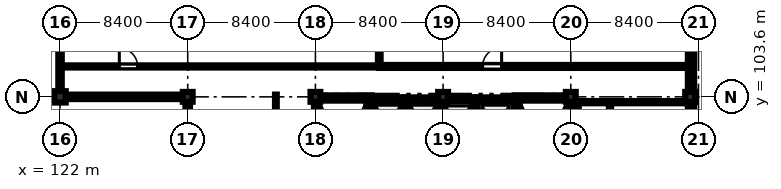
"""IFC4 building model, lengths in metres.
Left out: names, types, materials, properties, quantities, classifications, styles, units other than length and angle.
Written with IfcOpenShell. Run it as: python <this file> out.ifc"""

import sys

from ifc_helpers import new_model, si_unit, direction, frame, frame_2d, origin, origin_2d, place, context, subcontext, project, spatial, rectangle, extrude, element, fill, save


model = new_model("IFC4")
c1 = context("Model", 3, precision=1e-05, world=origin(), true_north=direction((0.0, 1.0)))
c2 = subcontext(c1, "Body", "Model", "MODEL_VIEW")
j1 = project(units=[si_unit("LENGTHUNIT", "METRE"), si_unit("PLANEANGLEUNIT", "RADIAN")], contexts=[c1])
p1 = place(None, origin())
s1 = spatial("IfcSite", under=j1, at=p1, CompositionType="ELEMENT")
p2 = place(p1, origin())
s2 = spatial("IfcBuilding", under=s1, at=p2, CompositionType="ELEMENT")
p3 = place(p2, frame((0.0, 0.0, 65.7)))
s3 = spatial("IfcBuildingStorey", under=s2, at=p3, CompositionType="ELEMENT", Elevation=65.7)
p4 = place(p3, frame((122.0, 103.6, 0.0), z_axis=(0.0, 0.0, 1.0), x_axis=(1.0, 0.0, 0.0)))
e1 = element("IfcColumn", 1, at=p4, inside=s3, PredefinedType="COLUMN", context=c2, shape_type="SweptSolid", body=[
    extrude(rectangle(XDim=0.75, YDim=0.75, at=origin_2d()), origin(), (0.0, 0.0, 1.0), 4.3),
])
for number, where, z_axis, x_axis in (
    (2, (130.4, 103.6, 0.0), (0.0, 0.0, 1.0), (1.0, 0.0, 0.0)),
    (3, (138.8, 103.6, 0.0), (0.0, 0.0, 1.0), (1.0, 0.0, 0.0)),
    (4, (147.2, 103.6, 0.0), (0.0, 0.0, 1.0), (1.0, 0.0, 0.0)),
    (5, (155.6, 103.6, 0.0), (0.0, 0.0, 1.0), (1.0, 0.0, 0.0)),
    (6, (163.45, 103.6, 0.0), (0.0, 0.0, 1.0), (1.0, 0.0, 0.0)),
):
    element("IfcColumn", number, at=place(p3, frame(where, z_axis=z_axis, x_axis=x_axis)), inside=s3, PredefinedType="COLUMN", context=c2, shape_type="SweptSolid", body=[
        extrude(rectangle(XDim=0.65, YDim=0.65, at=origin_2d()), origin(), (0.0, 0.0, 1.0), 4.3),
    ])
p5 = place(p3, frame((138.7, 103.525, 0.0), z_axis=(0.0, 0.0, 1.0), x_axis=(1.0, 0.0, 0.0)))
e7 = element("IfcWall", 7, at=p5, inside=s3, PredefinedType="SHEAR", context=c2, shape_type="SweptSolid", body=[
    extrude(rectangle(XDim=3.8, YDim=0.35, at=frame_2d((1.9, 0.0))), origin(), (0.0, 0.0, 1.0), 4.3),
])
p6 = place(p3, frame((138.875, 95.45, 0.0), z_axis=(0.0, 0.0, 1.0), x_axis=(0.0, 1.0, 0.0)))
e8 = element("IfcWall", 8, at=p6, inside=s3, PredefinedType="SHEAR", context=c2, shape_type="SweptSolid", body=[
    extrude(rectangle(XDim=7.9, YDim=0.35, at=frame_2d((3.95, 0.0))), origin(), (0.0, 0.0, 1.0), 4.3),
])
p7 = place(p3, frame((142.325, 95.45, 0.0), z_axis=(0.0, 0.0, 1.0), x_axis=(0.0, 1.0, 0.0)))
e9 = element("IfcWall", 9, at=p7, inside=s3, PredefinedType="SHEAR", context=c2, shape_type="SweptSolid", body=[
    extrude(rectangle(XDim=7.9, YDim=0.35, at=frame_2d((3.95, 0.0))), origin(), (0.0, 0.0, 1.0), 4.3),
])
p8 = place(p7, frame((0.22, 0.0, 0.0)))
e10 = element("IfcOpeningElement", 10, at=p8, cuts=e9, PredefinedType="OPENING", context=c2, shape_type="SweptSolid", body=[
    extrude(rectangle(XDim=1.15, YDim=2.15, at=frame_2d((0.575, 1.075))), frame((0.0, 0.185, 0.0), z_axis=(0.0, -1.0, 0.0), x_axis=(1.0, 0.0, 0.0)), (0.0, 0.0, 1.0), 0.37),
])
p9 = place(p3, frame((151.9, 103.525, 0.0), z_axis=(0.0, 0.0, 1.0), x_axis=(1.0, 0.0, 0.0)))
e11 = element("IfcWall", 11, at=p9, inside=s3, PredefinedType="SHEAR", context=c2, shape_type="SweptSolid", body=[
    extrude(rectangle(XDim=3.8, YDim=0.35, at=frame_2d((1.9, 0.0))), origin(), (0.0, 0.0, 1.0), 4.3),
])
p10 = place(p3, frame((152.075, 95.45, 0.0), z_axis=(0.0, 0.0, 1.0), x_axis=(0.0, 1.0, 0.0)))
e12 = element("IfcWall", 12, at=p10, inside=s3, PredefinedType="SHEAR", context=c2, shape_type="SweptSolid", body=[
    extrude(rectangle(XDim=7.9, YDim=0.35, at=frame_2d((3.95, 0.0))), origin(), (0.0, 0.0, 1.0), 4.3),
])
p11 = place(p10, frame((0.35, 0.0, 0.0)))
e13 = element("IfcOpeningElement", 13, at=p11, cuts=e12, PredefinedType="OPENING", context=c2, shape_type="SweptSolid", body=[
    extrude(rectangle(XDim=1.15, YDim=2.15, at=frame_2d((0.575, 1.075))), frame((0.0, 0.185, 0.0), z_axis=(0.0, -1.0, 0.0), x_axis=(1.0, 0.0, 0.0)), (0.0, 0.0, 1.0), 0.37),
])
p12 = place(p3, frame((155.525, 95.45, 0.0), z_axis=(0.0, 0.0, 1.0), x_axis=(0.0, 1.0, 0.0)))
e14 = element("IfcWall", 14, at=p12, inside=s3, PredefinedType="SHEAR", context=c2, shape_type="SweptSolid", body=[
    extrude(rectangle(XDim=7.9, YDim=0.35, at=frame_2d((3.95, 0.0))), origin(), (0.0, 0.0, 1.0), 4.3),
])
p13 = place(p3, frame((142.5, 103.425, 0.0), z_axis=(0.0, 0.0, 1.0), x_axis=(1.0, 0.0, 0.0)))
e15 = element("IfcWall", 15, at=p13, inside=s3, PredefinedType="SHEAR", context=c2, shape_type="SweptSolid", body=[
    extrude(rectangle(XDim=2.1, YDim=0.25, at=frame_2d((1.05, 0.0))), origin(), (0.0, 0.0, 1.0), 4.3),
])
p14 = place(p3, frame((144.725, 100.15, 0.0), z_axis=(0.0, 0.0, 1.0), x_axis=(0.0, 1.0, 0.0)))
e16 = element("IfcWall", 16, at=p14, inside=s3, PredefinedType="SHEAR", context=c2, shape_type="SweptSolid", body=[
    extrude(rectangle(XDim=3.4, YDim=0.25, at=frame_2d((1.7, 0.0))), origin(), (0.0, 0.0, 1.0), 4.3),
])
p15 = place(p3, frame((142.55, 103.425, 4.5), z_axis=(0.0, 0.0, 1.0), x_axis=(1.0, 0.0, 0.0)))
e17 = element("IfcWall", 17, at=p15, inside=s3, PredefinedType="SHEAR", context=c2, shape_type="SweptSolid", body=[
    extrude(rectangle(XDim=2.05, YDim=0.25, at=frame_2d((1.025, 0.0))), origin(), (0.0, 0.0, 1.0), 1.55),
])
for number, where, z_axis, x_axis in (
    (18, (144.725, 100.15, 4.5), (0.0, 0.0, 1.0), (0.0, 1.0, 0.0)),
    (19, (142.425, 100.15, 4.5), (0.0, 0.0, 1.0), (0.0, 1.0, 0.0)),
):
    element("IfcWall", number, at=place(p3, frame(where, z_axis=z_axis, x_axis=x_axis)), inside=s3, PredefinedType="SHEAR", context=c2, shape_type="SweptSolid", body=[
        extrude(rectangle(XDim=3.4, YDim=0.25, at=frame_2d((1.7, 0.0))), origin(), (0.0, 0.0, 1.0), 1.55),
    ])
p16 = place(p3, frame((144.85, 103.425, 0.0), z_axis=(0.0, 0.0, 1.0), x_axis=(1.0, 0.0, 0.0)))
e20 = element("IfcWall", 20, at=p16, inside=s3, PredefinedType="SHEAR", context=c2, shape_type="SweptSolid", body=[
    extrude(rectangle(XDim=2.05, YDim=0.25, at=frame_2d((1.025, 0.0))), origin(), (0.0, 0.0, 1.0), 4.3),
])
p17 = place(p3, frame((147.025, 100.15, 0.0), z_axis=(0.0, 0.0, 1.0), x_axis=(0.0, 1.0, 0.0)))
e21 = element("IfcWall", 21, at=p17, inside=s3, PredefinedType="SHEAR", context=c2, shape_type="SweptSolid", body=[
    extrude(rectangle(XDim=3.4, YDim=0.25, at=frame_2d((1.7, 0.0))), origin(), (0.0, 0.0, 1.0), 4.3),
])
p18 = place(p3, frame((144.85, 103.425, 4.5), z_axis=(0.0, 0.0, 1.0), x_axis=(1.0, 0.0, 0.0)))
e22 = element("IfcWall", 22, at=p18, inside=s3, PredefinedType="SHEAR", context=c2, shape_type="SweptSolid", body=[
    extrude(rectangle(XDim=2.05, YDim=0.25, at=frame_2d((1.025, 0.0))), origin(), (0.0, 0.0, 1.0), 1.55),
])
p19 = place(p3, frame((147.025, 100.15, 4.5), z_axis=(0.0, 0.0, 1.0), x_axis=(0.0, 1.0, 0.0)))
e23 = element("IfcWall", 23, at=p19, inside=s3, PredefinedType="SHEAR", context=c2, shape_type="SweptSolid", body=[
    extrude(rectangle(XDim=3.4, YDim=0.25, at=frame_2d((1.7, 0.0))), origin(), (0.0, 0.0, 1.0), 1.55),
])
p20 = place(p3, frame((147.15, 103.425, 0.0), z_axis=(0.0, 0.0, 1.0), x_axis=(1.0, 0.0, 0.0)))
e24 = element("IfcWall", 24, at=p20, inside=s3, PredefinedType="SHEAR", context=c2, shape_type="SweptSolid", body=[
    extrude(rectangle(XDim=2.05, YDim=0.25, at=frame_2d((1.025, 0.0))), origin(), (0.0, 0.0, 1.0), 4.3),
])
p21 = place(p3, frame((149.325, 100.35, 0.0), z_axis=(0.0, 0.0, 1.0), x_axis=(0.0, 1.0, 0.0)))
e25 = element("IfcWall", 25, at=p21, inside=s3, PredefinedType="SHEAR", context=c2, shape_type="SweptSolid", body=[
    extrude(rectangle(XDim=3.2, YDim=0.25, at=frame_2d((1.6, 0.0))), origin(), (0.0, 0.0, 1.0), 4.3),
])
p22 = place(p3, frame((147.15, 103.425, 4.5), z_axis=(0.0, 0.0, 1.0), x_axis=(1.0, 0.0, 0.0)))
e26 = element("IfcWall", 26, at=p22, inside=s3, PredefinedType="SHEAR", context=c2, shape_type="SweptSolid", body=[
    extrude(rectangle(XDim=2.05, YDim=0.25, at=frame_2d((1.025, 0.0))), origin(), (0.0, 0.0, 1.0), 1.55),
])
p23 = place(p3, frame((149.325, 100.35, 4.5), z_axis=(0.0, 0.0, 1.0), x_axis=(0.0, 1.0, 0.0)))
e27 = element("IfcWall", 27, at=p23, inside=s3, PredefinedType="SHEAR", context=c2, shape_type="SweptSolid", body=[
    extrude(rectangle(XDim=3.2, YDim=0.25, at=frame_2d((1.6, 0.0))), origin(), (0.0, 0.0, 1.0), 1.55),
])
p24 = place(p3, frame((149.45, 103.425, 0.0), z_axis=(0.0, 0.0, 1.0), x_axis=(1.0, 0.0, 0.0)))
e28 = element("IfcWall", 28, at=p24, inside=s3, PredefinedType="SHEAR", context=c2, shape_type="SweptSolid", body=[
    extrude(rectangle(XDim=2.45, YDim=0.25, at=frame_2d((1.225, 0.0))), origin(), (0.0, 0.0, 1.0), 4.3),
])
p25 = place(p3, frame((149.45, 103.425, 4.5), z_axis=(0.0, 0.0, 1.0), x_axis=(1.0, 0.0, 0.0)))
e29 = element("IfcWall", 29, at=p25, inside=s3, PredefinedType="SHEAR", context=c2, shape_type="SweptSolid", body=[
    extrude(rectangle(XDim=2.4, YDim=0.25, at=frame_2d((1.2, 0.0))), origin(), (0.0, 0.0, 1.0), 1.55),
])
p26 = place(p3, frame((151.975, 100.05, 4.5), z_axis=(0.0, 0.0, 1.0), x_axis=(0.0, 1.0, 0.0)))
e30 = element("IfcWall", 30, at=p26, inside=s3, PredefinedType="SHEAR", context=c2, shape_type="SweptSolid", body=[
    extrude(rectangle(XDim=3.5, YDim=0.25, at=frame_2d((1.75, 0.0))), origin(), (0.0, 0.0, 1.0), 1.55),
])
p27 = place(p3, frame((163.45, 103.275, 0.0), z_axis=(0.0, 0.0, 1.0), x_axis=(0.0, -1.0, 0.0)))
e31 = element("IfcWall", 31, at=p27, inside=s3, PredefinedType="STANDARD", context=c2, shape_type="SweptSolid", body=[
    extrude(rectangle(XDim=7.75, YDim=0.3, at=frame_2d((3.875, 0.0))), origin(), (0.0, 0.0, 1.0), 3.7),
])
p28 = place(p27, frame((1.15, 0.0, 1.1)))
e32 = element("IfcOpeningElement", 32, at=p28, cuts=e31, PredefinedType="OPENING", context=c2, shape_type="SweptSolid", body=[
    extrude(rectangle(XDim=1.4, YDim=1.4, at=frame_2d((0.7, 0.7))), frame((0.0, 0.16, 0.0), z_axis=(0.0, -1.0, 0.0), x_axis=(1.0, 0.0, 0.0)), (0.0, 0.0, 1.0), 0.32),
])
p29 = place(p3, frame((163.45, 111.125, 0.0), z_axis=(0.0, 0.0, 1.0), x_axis=(0.0, -1.0, 0.0)))
e33 = element("IfcWall", 33, at=p29, inside=s3, PredefinedType="STANDARD", context=c2, shape_type="SweptSolid", body=[
    extrude(rectangle(XDim=7.2, YDim=0.3, at=frame_2d((3.6, 0.0))), origin(), (0.0, 0.0, 1.0), 3.7),
])
p30 = place(p29, frame((1.15, 0.0, 1.1)))
e34 = element("IfcOpeningElement", 34, at=p30, cuts=e33, PredefinedType="OPENING", context=c2, shape_type="SweptSolid", body=[
    extrude(rectangle(XDim=1.8, YDim=1.8, at=frame_2d((0.9, 0.9))), frame((0.0, 0.16, 0.0), z_axis=(0.0, -1.0, 0.0), x_axis=(1.0, 0.0, 0.0)), (0.0, 0.0, 1.0), 0.32),
])
p31 = place(p3, frame((130.4, 95.525, 0.0), z_axis=(0.0, 0.0, 1.0), x_axis=(0.0, 1.0, 0.0)))
e35 = element("IfcWall", 35, at=p31, inside=s3, PredefinedType="STANDARD", context=c2, shape_type="SweptSolid", body=[
    extrude(rectangle(XDim=7.75, YDim=0.3, at=frame_2d((3.875, 0.0))), origin(), (0.0, 0.0, 1.0), 3.7),
])
p32 = place(p31, frame((2.4, 0.0, 1.0)))
e36 = element("IfcOpeningElement", 36, at=p32, cuts=e35, PredefinedType="OPENING", context=c2, shape_type="SweptSolid", body=[
    extrude(rectangle(XDim=1.8, YDim=1.8, at=frame_2d((0.9, 0.9))), frame((0.0, 0.16, 0.0), z_axis=(0.0, -1.0, 0.0), x_axis=(1.0, 0.0, 0.0)), (0.0, 0.0, 1.0), 0.32),
])
p33 = place(p3, frame((130.075, 103.6, 0.0), z_axis=(0.0, 0.0, 1.0), x_axis=(-1.0, 0.0, 0.0)))
e37 = element("IfcWall", 37, at=p33, inside=s3, PredefinedType="STANDARD", context=c2, shape_type="SweptSolid", body=[
    extrude(rectangle(XDim=7.7, YDim=0.3, at=frame_2d((3.85, 0.0))), origin(), (0.0, 0.0, 1.0), 3.7),
])
p34 = place(p3, frame((163.6, 78.515, 4.5), z_axis=(0.0, 0.0, 1.0), x_axis=(0.0, 1.0, 0.0)))
e38 = element("IfcWall", 38, at=p34, inside=s3, PredefinedType="PARAPET", context=c2, shape_type="SweptSolid", body=[
    extrude(rectangle(XDim=32.97, YDim=0.23, at=frame_2d((16.485, 0.0))), origin(), (0.0, 0.0, 1.0), 1.35),
])
p35 = place(p3, frame((122.0, 111.485, 4.5), z_axis=(0.0, 0.0, 1.0), x_axis=(0.0, -1.0, 0.0)))
e39 = element("IfcWall", 39, at=p35, inside=s3, PredefinedType="PARAPET", context=c2, shape_type="SweptSolid", body=[
    extrude(rectangle(XDim=7.77, YDim=0.23, at=frame_2d((3.885, 0.0))), origin(), (0.0, 0.0, 1.0), 1.35),
])
p36 = place(p3, frame((121.885, 103.6, 4.5), z_axis=(0.0, 0.0, 1.0), x_axis=(1.0, 0.0, 0.0)))
e40 = element("IfcWall", 40, at=p36, inside=s3, PredefinedType="PARAPET", context=c2, shape_type="SweptSolid", body=[
    extrude(rectangle(XDim=8.63, YDim=0.23, at=frame_2d((4.315, 0.0))), origin(), (0.0, 0.0, 1.0), 1.35),
])
p37 = place(p3, frame((130.4, 103.485, 4.5), z_axis=(0.0, 0.0, 1.0), x_axis=(0.0, -1.0, 0.0)))
e41 = element("IfcWall", 41, at=p37, inside=s3, PredefinedType="PARAPET", context=c2, shape_type="SweptSolid", body=[
    extrude(rectangle(XDim=11.37, YDim=0.23, at=frame_2d((5.685, 0.0))), origin(), (0.0, 0.0, 1.0), 1.35),
])
p38 = place(p3, frame((158.18, 94.68, 0.0), z_axis=(0.0, 0.0, 1.0), x_axis=(0.0, 1.0, 0.0)))
e42 = element("IfcWall", 42, at=p38, inside=s3, PredefinedType="PARTITIONING", context=c2, shape_type="SweptSolid", body=[
    extrude(rectangle(XDim=8.57, YDim=0.15, at=frame_2d((4.285, 0.0))), origin(), (0.0, 0.0, 1.0), 4.3),
])
p39 = place(p38, frame((0.8, 0.0, 0.0)))
e43 = element("IfcOpeningElement", 43, at=p39, cuts=e42, PredefinedType="OPENING", context=c2, shape_type="SweptSolid", body=[
    extrude(rectangle(XDim=1.0, YDim=2.12, at=frame_2d((0.5, 1.06))), frame((0.0, 0.085, 0.0), z_axis=(0.0, -1.0, 0.0), x_axis=(1.0, 0.0, 0.0)), (0.0, 0.0, 1.0), 0.17),
])
p40 = place(p38, frame((3.5, 0.0, 0.0)))
e44 = element("IfcOpeningElement", 44, at=p40, cuts=e42, PredefinedType="OPENING", context=c2, shape_type="SweptSolid", body=[
    extrude(rectangle(XDim=0.92, YDim=2.1, at=frame_2d((0.46, 1.05))), frame((0.0, 0.085, 0.0), z_axis=(0.0, -1.0, 0.0), x_axis=(1.0, 0.0, 0.0)), (0.0, 0.0, 1.0), 0.17),
])
p41 = place(p38, frame((6.4, 0.0, 0.0)))
e45 = element("IfcOpeningElement", 45, at=p41, cuts=e42, PredefinedType="OPENING", context=c2, shape_type="SweptSolid", body=[
    extrude(rectangle(XDim=0.92, YDim=2.1, at=frame_2d((0.46, 1.05))), frame((0.0, 0.085, 0.0), z_axis=(0.0, -1.0, 0.0), x_axis=(1.0, 0.0, 0.0)), (0.0, 0.0, 1.0), 0.17),
])
p42 = place(p3, frame((156.05, 103.25, 0.0), z_axis=(0.0, 0.0, 1.0), x_axis=(1.0, 0.0, 0.0)))
e46 = element("IfcWall", 46, at=p42, inside=s3, PredefinedType="PARTITIONING", context=c2, shape_type="SweptSolid", body=[
    extrude(rectangle(XDim=7.15, YDim=0.15, at=frame_2d((3.575, 0.0))), origin(), (0.0, 0.0, 1.0), 4.3),
])
p43 = place(p3, frame((156.05, 94.68, 0.0), z_axis=(0.0, 0.0, 1.0), x_axis=(0.0, 1.0, 0.0)))
e47 = element("IfcWall", 47, at=p43, inside=s3, PredefinedType="PARTITIONING", context=c2, shape_type="SweptSolid", body=[
    extrude(rectangle(XDim=8.57, YDim=0.15, at=frame_2d((4.285, 0.0))), origin(), (0.0, 0.0, 1.0), 4.3),
])
p44 = place(p3, frame((136.2, 94.68, 0.0), z_axis=(0.0, 0.0, 1.0), x_axis=(0.0, 1.0, 0.0)))
e48 = element("IfcWall", 48, at=p44, inside=s3, PredefinedType="PARTITIONING", context=c2, shape_type="SweptSolid", body=[
    extrude(rectangle(XDim=9.07, YDim=0.12, at=frame_2d((4.535, 0.0))), origin(), (0.0, 0.0, 1.0), 4.3),
])
p45 = place(p3, frame((122.15, 105.6, 0.0), z_axis=(0.0, 0.0, 1.0), x_axis=(1.0, 0.0, 0.0)))
e49 = element("IfcWall", 49, at=p45, inside=s3, PredefinedType="PARTITIONING", context=c2, shape_type="SweptSolid", body=[
    extrude(rectangle(XDim=20.85, YDim=0.145, at=frame_2d((10.425, 0.0))), origin(), (0.0, 0.0, 1.0), 4.3),
])
p46 = place(p45, frame((3.75, 0.0, 0.0)))
e50 = element("IfcOpeningElement", 50, at=p46, cuts=e49, PredefinedType="OPENING", context=c2, shape_type="SweptSolid", body=[
    extrude(rectangle(XDim=1.2, YDim=2.2, at=frame_2d((0.6, 1.1))), frame((0.0, 0.083, 0.0), z_axis=(0.0, -1.0, 0.0), x_axis=(1.0, 0.0, 0.0)), (0.0, 0.0, 1.0), 0.165),
])
p47 = place(p3, frame((143.0, 105.6, 0.0), z_axis=(0.0, 0.0, 1.0), x_axis=(1.0, 0.0, 0.0)))
e51 = element("IfcWall", 51, at=p47, inside=s3, PredefinedType="SOLIDWALL", context=c2, shape_type="SweptSolid", body=[
    extrude(rectangle(XDim=20.35, YDim=0.2, at=frame_2d((10.175, 0.0))), origin(), (0.0, 0.0, 1.0), 4.3),
])
p48 = place(p47, frame((6.8, 0.0, 0.0)))
e52 = element("IfcOpeningElement", 52, at=p48, cuts=e51, PredefinedType="OPENING", context=c2, shape_type="SweptSolid", body=[
    extrude(rectangle(XDim=1.25, YDim=2.2, at=frame_2d((0.625, 1.1))), frame((0.0, 0.11, 0.0), z_axis=(0.0, -1.0, 0.0), x_axis=(1.0, 0.0, 0.0)), (0.0, 0.0, 1.0), 0.22),
])
p49 = place(p3, frame((143.0, 105.6, 0.0), z_axis=(0.0, 0.0, 1.0), x_axis=(0.0, 1.0, 0.0)))
e53 = element("IfcWall", 53, at=p49, inside=s3, PredefinedType="STANDARD", context=c2, shape_type="SweptSolid", body=[
    extrude(rectangle(XDim=5.75, YDim=0.18, at=frame_2d((2.875, 0.0))), origin(), (0.0, 0.0, 1.0), 3.85),
])
p50 = place(p46, origin())
e54 = element("IfcDoor", 54, at=p50, inside=s3, OperationType="SINGLE_SWING_LEFT", PredefinedType="DOOR", context=c2, shape_type="SweptSolid", body=[
    extrude(rectangle(XDim=1.2, YDim=2.2, at=frame_2d((0.6, 1.1))), frame((0.0, 0.025, 0.0), z_axis=(0.0, -1.0, 0.0), x_axis=(1.0, 0.0, 0.0)), (0.0, 0.0, 1.0), 0.05),
])
fill(e50, e54)
p51 = place(p48, origin())
e55 = element("IfcDoor", 55, at=p51, inside=s3, OperationType="SINGLE_SWING_RIGHT", PredefinedType="DOOR", context=c2, shape_type="SweptSolid", body=[
    extrude(rectangle(XDim=1.25, YDim=2.2, at=frame_2d((0.625, 1.1))), frame((0.0, 0.025, 0.0), z_axis=(0.0, -1.0, 0.0), x_axis=(1.0, 0.0, 0.0)), (0.0, 0.0, 1.0), 0.05),
])
fill(e52, e55)
save(model, sys.argv[1])
